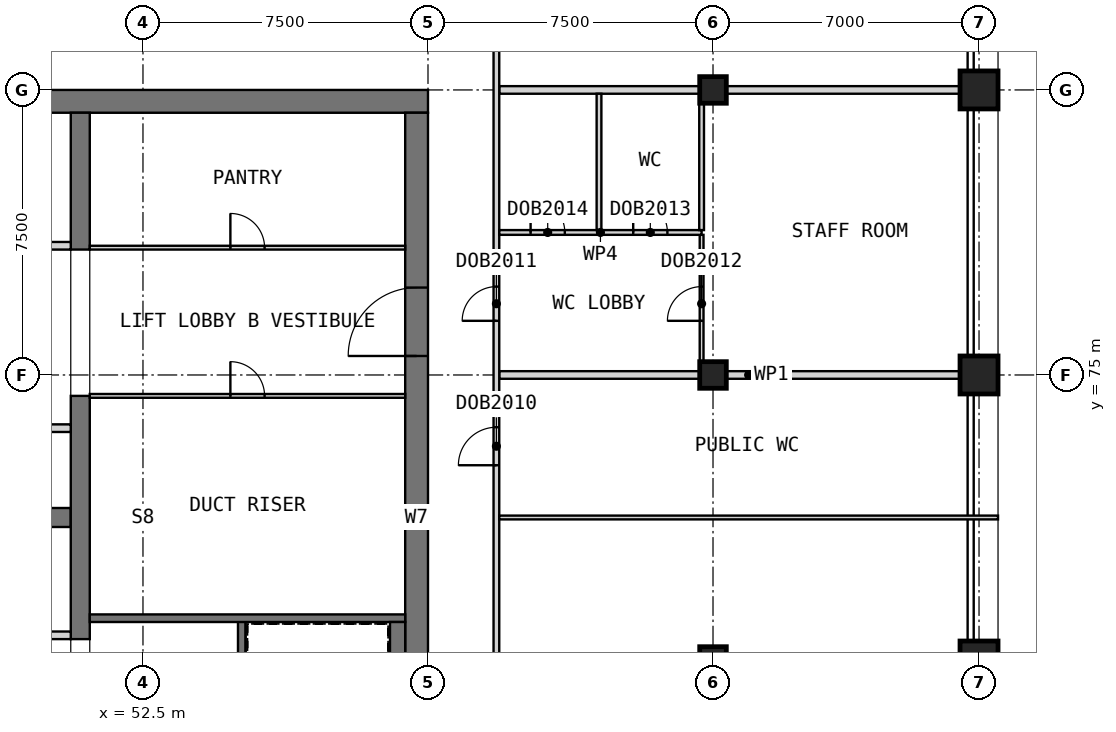
"""IFC4 building model, lengths in metres.
Left out: names, types, materials, properties, quantities, classifications, styles, units other than length and angle.
Written with IfcOpenShell. Run it as: python <this file> out.ifc"""

import sys

from ifc_helpers import new_model, si_unit, direction, frame, frame_2d, origin, origin_2d, place, context, subcontext, project, spatial, rectangle, extrude, element, fill, save


model = new_model("IFC4")
c1 = context("Model", 3, precision=1e-05, world=origin(), true_north=direction((0.0, 1.0)))
c2 = subcontext(c1, "Body", "Model", "MODEL_VIEW")
j1 = project(units=[si_unit("LENGTHUNIT", "METRE"), si_unit("PLANEANGLEUNIT", "RADIAN")], contexts=[c1])
p1 = place(None, origin())
s1 = spatial("IfcSite", under=j1, at=p1, CompositionType="ELEMENT")
p2 = place(p1, origin())
s2 = spatial("IfcBuilding", under=s1, at=p2, CompositionType="ELEMENT")
p3 = place(p2, frame((0.0, 0.0, 308.7)))
s3 = spatial("IfcBuildingStorey", under=s2, at=p3, CompositionType="ELEMENT", Elevation=308.7)
for number, where, z_axis, x_axis in (
    (1, (67.5, 67.5, 0.0), (0.0, 0.0, 1.0), (1.0, 0.0, 0.0)),
    (2, (67.5, 75.0, 0.0), (0.0, 0.0, 1.0), (1.0, 0.0, 0.0)),
    (3, (67.5, 82.5, 0.0), (0.0, 0.0, 1.0), (1.0, 0.0, 0.0)),
):
    element("IfcColumn", number, at=place(p3, frame(where, z_axis=z_axis, x_axis=x_axis)), inside=s3, PredefinedType="COLUMN", context=c2, shape_type="SweptSolid", body=[
        extrude(rectangle(XDim=0.7, YDim=0.7, at=origin_2d()), origin(), (0.0, 0.0, 1.0), 6.0),
    ])
for number, where, z_axis, x_axis in (
    (4, (74.5, 67.5, 0.0), (0.0, 0.0, 1.0), (1.0, 0.0, 0.0)),
    (5, (74.5, 75.0, 0.0), (0.0, 0.0, 1.0), (1.0, 0.0, 0.0)),
    (6, (74.5, 82.5, 0.0), (0.0, 0.0, 1.0), (1.0, 0.0, 0.0)),
):
    element("IfcColumn", number, at=place(p3, frame(where, z_axis=z_axis, x_axis=x_axis)), inside=s3, PredefinedType="COLUMN", context=c2, shape_type="SweptSolid", body=[
        extrude(rectangle(XDim=1.0, YDim=1.0, at=origin_2d()), origin(), (0.0, 0.0, 1.0), 6.0),
    ])
p4 = place(p3, frame((30.0, 82.2, 0.0), z_axis=(0.0, 0.0, 1.0), x_axis=(1.0, 0.0, 0.0)))
e7 = element("IfcWall", 7, at=p4, inside=s3, PredefinedType="SHEAR", context=c2, shape_type="SweptSolid", body=[
    extrude(rectangle(XDim=30.0, YDim=0.6, at=frame_2d((15.0, 0.0))), origin(), (0.0, 0.0, 1.0), 6.0),
])
p5 = place(p3, frame((59.7, 60.6, 0.0), z_axis=(0.0, 0.0, 1.0), x_axis=(0.0, 1.0, 0.0)))
e8 = element("IfcWall", 8, at=p5, inside=s3, PredefinedType="SHEAR", context=c2, shape_type="SweptSolid", body=[
    extrude(rectangle(XDim=21.3, YDim=0.6, at=frame_2d((10.65, 0.0))), origin(), (0.0, 0.0, 1.0), 6.0),
])
p6 = place(p5, frame((14.9, 0.0, 0.0)))
e9 = element("IfcOpeningElement", 9, at=p6, cuts=e8, PredefinedType="OPENING", context=c2, shape_type="SweptSolid", body=[
    extrude(rectangle(XDim=1.8, YDim=2.1, at=frame_2d((0.9, 1.05))), frame((0.0, 0.31, 0.0), z_axis=(0.0, -1.0, 0.0), x_axis=(1.0, 0.0, 0.0)), (0.0, 0.0, 1.0), 0.62),
])
p7 = place(p3, frame((35.0, 71.25, 0.0), z_axis=(0.0, 0.0, 1.0), x_axis=(1.0, 0.0, 0.0)))
e10 = element("IfcWall", 10, at=p7, inside=s3, PredefinedType="SHEAR", context=c2, shape_type="SweptSolid", body=[
    extrude(rectangle(XDim=15.6, YDim=0.5, at=frame_2d((7.8, 0.0))), origin(), (0.0, 0.0, 1.0), 6.0),
])
p8 = place(p3, frame((50.85, 68.05, 0.0), z_axis=(0.0, 0.0, 1.0), x_axis=(0.0, 1.0, 0.0)))
e11 = element("IfcWall", 11, at=p8, inside=s3, PredefinedType="SHEAR", context=c2, shape_type="SweptSolid", body=[
    extrude(rectangle(XDim=6.4, YDim=0.5, at=frame_2d((3.2, 0.0))), origin(), (0.0, 0.0, 1.0), 6.0),
])
p9 = place(p3, frame((50.85, 78.3, 0.0), z_axis=(0.0, 0.0, 1.0), x_axis=(0.0, 1.0, 0.0)))
e12 = element("IfcWall", 12, at=p9, inside=s3, PredefinedType="SHEAR", context=c2, shape_type="SweptSolid", body=[
    extrude(rectangle(XDim=3.6, YDim=0.5, at=frame_2d((1.8, 0.0))), origin(), (0.0, 0.0, 1.0), 6.0),
])
p10 = place(p3, frame((35.0, 68.15, 0.0), z_axis=(0.0, 0.0, 1.0), x_axis=(1.0, 0.0, 0.0)))
e13 = element("IfcWall", 13, at=p10, inside=s3, PredefinedType="PARTITIONING", context=c2, shape_type="SweptSolid", body=[
    extrude(rectangle(XDim=15.6, YDim=0.2, at=frame_2d((7.8, 0.0))), origin(), (0.0, 0.0, 1.0), 5.59),
])
p11 = place(p10, frame((2.15, 0.0, 0.0)))
e14 = element("IfcOpeningElement", 14, at=p11, cuts=e13, PredefinedType="OPENING", context=c2, shape_type="SweptSolid", body=[
    extrude(rectangle(XDim=0.9, YDim=2.1, at=frame_2d((0.45, 1.05))), frame((0.0, 0.11, 0.0), z_axis=(0.0, -1.0, 0.0), x_axis=(1.0, 0.0, 0.0)), (0.0, 0.0, 1.0), 0.22),
])
p12 = place(p10, frame((7.35, 0.0, 0.0)))
e15 = element("IfcOpeningElement", 15, at=p12, cuts=e13, PredefinedType="OPENING", context=c2, shape_type="SweptSolid", body=[
    extrude(rectangle(XDim=0.9, YDim=2.1, at=frame_2d((0.45, 1.05))), frame((0.0, 0.11, 0.0), z_axis=(0.0, -1.0, 0.0), x_axis=(1.0, 0.0, 0.0)), (0.0, 0.0, 1.0), 0.22),
])
p13 = place(p10, frame((12.55, 0.0, 0.0)))
e16 = element("IfcOpeningElement", 16, at=p13, cuts=e13, PredefinedType="OPENING", context=c2, shape_type="SweptSolid", body=[
    extrude(rectangle(XDim=0.9, YDim=2.1, at=frame_2d((0.45, 1.05))), frame((0.0, 0.11, 0.0), z_axis=(0.0, -1.0, 0.0), x_axis=(1.0, 0.0, 0.0)), (0.0, 0.0, 1.0), 0.22),
])
p14 = place(p3, frame((35.0, 73.6, 0.0), z_axis=(0.0, 0.0, 1.0), x_axis=(1.0, 0.0, 0.0)))
e17 = element("IfcWall", 17, at=p14, inside=s3, PredefinedType="SOLIDWALL", context=c2, shape_type="SweptSolid", body=[
    extrude(rectangle(XDim=15.6, YDim=0.2, at=frame_2d((7.8, 0.0))), origin(), (0.0, 0.0, 1.0), 6.0),
])
p15 = place(p14, frame((0.75, 0.0, 0.0)))
e18 = element("IfcOpeningElement", 18, at=p15, cuts=e17, PredefinedType="OPENING", context=c2, shape_type="SweptSolid", body=[
    extrude(rectangle(XDim=1.1, YDim=2.1, at=frame_2d((0.55, 1.05))), frame((0.0, 0.11, 0.0), z_axis=(0.0, -1.0, 0.0), x_axis=(1.0, 0.0, 0.0)), (0.0, 0.0, 1.0), 0.22),
])
p16 = place(p14, frame((3.35, 0.0, 0.0)))
e19 = element("IfcOpeningElement", 19, at=p16, cuts=e17, PredefinedType="OPENING", context=c2, shape_type="SweptSolid", body=[
    extrude(rectangle(XDim=1.1, YDim=2.1, at=frame_2d((0.55, 1.05))), frame((0.0, 0.11, 0.0), z_axis=(0.0, -1.0, 0.0), x_axis=(1.0, 0.0, 0.0)), (0.0, 0.0, 1.0), 0.22),
])
p17 = place(p14, frame((5.95, 0.0, 0.0)))
e20 = element("IfcOpeningElement", 20, at=p17, cuts=e17, PredefinedType="OPENING", context=c2, shape_type="SweptSolid", body=[
    extrude(rectangle(XDim=1.1, YDim=2.1, at=frame_2d((0.55, 1.05))), frame((0.0, 0.11, 0.0), z_axis=(0.0, -1.0, 0.0), x_axis=(1.0, 0.0, 0.0)), (0.0, 0.0, 1.0), 0.22),
])
p18 = place(p14, frame((8.55, 0.0, 0.0)))
e21 = element("IfcOpeningElement", 21, at=p18, cuts=e17, PredefinedType="OPENING", context=c2, shape_type="SweptSolid", body=[
    extrude(rectangle(XDim=1.1, YDim=2.1, at=frame_2d((0.55, 1.05))), frame((0.0, 0.11, 0.0), z_axis=(0.0, -1.0, 0.0), x_axis=(1.0, 0.0, 0.0)), (0.0, 0.0, 1.0), 0.22),
])
p19 = place(p14, frame((11.15, 0.0, 0.0)))
e22 = element("IfcOpeningElement", 22, at=p19, cuts=e17, PredefinedType="OPENING", context=c2, shape_type="SweptSolid", body=[
    extrude(rectangle(XDim=1.1, YDim=2.1, at=frame_2d((0.55, 1.05))), frame((0.0, 0.11, 0.0), z_axis=(0.0, -1.0, 0.0), x_axis=(1.0, 0.0, 0.0)), (0.0, 0.0, 1.0), 0.22),
])
p20 = place(p14, frame((13.75, 0.0, 0.0)))
e23 = element("IfcOpeningElement", 23, at=p20, cuts=e17, PredefinedType="OPENING", context=c2, shape_type="SweptSolid", body=[
    extrude(rectangle(XDim=1.1, YDim=2.1, at=frame_2d((0.55, 1.05))), frame((0.0, 0.11, 0.0), z_axis=(0.0, -1.0, 0.0), x_axis=(1.0, 0.0, 0.0)), (0.0, 0.0, 1.0), 0.22),
])
p21 = place(p3, frame((35.0, 78.4, 0.0), z_axis=(0.0, 0.0, 1.0), x_axis=(1.0, 0.0, 0.0)))
e24 = element("IfcWall", 24, at=p21, inside=s3, PredefinedType="SOLIDWALL", context=c2, shape_type="SweptSolid", body=[
    extrude(rectangle(XDim=15.6, YDim=0.2, at=frame_2d((7.8, 0.0))), origin(), (0.0, 0.0, 1.0), 6.0),
])
p22 = place(p21, frame((0.75, 0.0, 0.0)))
e25 = element("IfcOpeningElement", 25, at=p22, cuts=e24, PredefinedType="OPENING", context=c2, shape_type="SweptSolid", body=[
    extrude(rectangle(XDim=1.1, YDim=2.1, at=frame_2d((0.55, 1.05))), frame((0.0, 0.11, 0.0), z_axis=(0.0, -1.0, 0.0), x_axis=(1.0, 0.0, 0.0)), (0.0, 0.0, 1.0), 0.22),
])
p23 = place(p21, frame((3.35, 0.0, 0.0)))
e26 = element("IfcOpeningElement", 26, at=p23, cuts=e24, PredefinedType="OPENING", context=c2, shape_type="SweptSolid", body=[
    extrude(rectangle(XDim=1.1, YDim=2.1, at=frame_2d((0.55, 1.05))), frame((0.0, 0.11, 0.0), z_axis=(0.0, -1.0, 0.0), x_axis=(1.0, 0.0, 0.0)), (0.0, 0.0, 1.0), 0.22),
])
p24 = place(p21, frame((5.95, 0.0, 0.0)))
e27 = element("IfcOpeningElement", 27, at=p24, cuts=e24, PredefinedType="OPENING", context=c2, shape_type="SweptSolid", body=[
    extrude(rectangle(XDim=1.1, YDim=2.1, at=frame_2d((0.55, 1.05))), frame((0.0, 0.11, 0.0), z_axis=(0.0, -1.0, 0.0), x_axis=(1.0, 0.0, 0.0)), (0.0, 0.0, 1.0), 0.22),
])
p25 = place(p21, frame((8.55, 0.0, 0.0)))
e28 = element("IfcOpeningElement", 28, at=p25, cuts=e24, PredefinedType="OPENING", context=c2, shape_type="SweptSolid", body=[
    extrude(rectangle(XDim=1.1, YDim=2.1, at=frame_2d((0.55, 1.05))), frame((0.0, 0.11, 0.0), z_axis=(0.0, -1.0, 0.0), x_axis=(1.0, 0.0, 0.0)), (0.0, 0.0, 1.0), 0.22),
])
p26 = place(p21, frame((11.15, 0.0, 0.0)))
e29 = element("IfcOpeningElement", 29, at=p26, cuts=e24, PredefinedType="OPENING", context=c2, shape_type="SweptSolid", body=[
    extrude(rectangle(XDim=1.1, YDim=2.1, at=frame_2d((0.55, 1.05))), frame((0.0, 0.11, 0.0), z_axis=(0.0, -1.0, 0.0), x_axis=(1.0, 0.0, 0.0)), (0.0, 0.0, 1.0), 0.22),
])
p27 = place(p21, frame((13.75, 0.0, 0.0)))
e30 = element("IfcOpeningElement", 30, at=p27, cuts=e24, PredefinedType="OPENING", context=c2, shape_type="SweptSolid", body=[
    extrude(rectangle(XDim=1.1, YDim=2.1, at=frame_2d((0.55, 1.05))), frame((0.0, 0.11, 0.0), z_axis=(0.0, -1.0, 0.0), x_axis=(1.0, 0.0, 0.0)), (0.0, 0.0, 1.0), 0.22),
])
p28 = place(p3, frame((55.1, 60.6, 0.0), z_axis=(0.0, 0.0, 1.0), x_axis=(0.0, 1.0, 0.0)))
e31 = element("IfcWall", 31, at=p28, inside=s3, PredefinedType="SOLIDWALL", context=c2, shape_type="SweptSolid", body=[
    extrude(rectangle(XDim=8.0, YDim=0.2, at=frame_2d((4.0, 0.0))), origin(), (0.0, 0.0, 1.0), 5.59),
])
p29 = place(p3, frame((51.1, 68.6, 0.0), z_axis=(0.0, 0.0, 1.0), x_axis=(1.0, 0.0, 0.0)))
e32 = element("IfcWall", 32, at=p29, inside=s3, PredefinedType="SOLIDWALL", context=c2, shape_type="SweptSolid", body=[
    extrude(rectangle(XDim=8.3, YDim=0.2, at=frame_2d((4.15, 0.0))), origin(), (0.0, 0.0, 1.0), 5.59),
])
p30 = place(p3, frame((59.2, 60.6, 0.0), z_axis=(0.0, 0.0, 1.0), x_axis=(0.0, 1.0, 0.0)))
e33 = element("IfcWall", 33, at=p30, inside=s3, PredefinedType="SOLIDWALL", context=c2, shape_type="SweptSolid", body=[
    extrude(rectangle(XDim=7.9, YDim=0.4, at=frame_2d((3.95, 0.0))), origin(), (0.0, 0.0, 1.0), 5.59),
])
p31 = place(p3, frame((51.1, 74.45, 0.0), z_axis=(0.0, 0.0, 1.0), x_axis=(1.0, 0.0, 0.0)))
e34 = element("IfcWall", 34, at=p31, inside=s3, PredefinedType="PARTITIONING", context=c2, shape_type="SweptSolid", body=[
    extrude(rectangle(XDim=8.3, YDim=0.1, at=frame_2d((4.15, 0.0))), origin(), (0.0, 0.0, 1.0), 5.59),
])
p32 = place(p31, frame((3.7, 0.0, 0.0)))
e35 = element("IfcOpeningElement", 35, at=p32, cuts=e34, PredefinedType="OPENING", context=c2, shape_type="SweptSolid", body=[
    extrude(rectangle(XDim=0.9, YDim=2.1, at=frame_2d((0.45, 1.05))), frame((0.0, 0.06, 0.0), z_axis=(0.0, -1.0, 0.0), x_axis=(1.0, 0.0, 0.0)), (0.0, 0.0, 1.0), 0.12),
])
p33 = place(p3, frame((51.1, 78.35, 0.0), z_axis=(0.0, 0.0, 1.0), x_axis=(1.0, 0.0, 0.0)))
e36 = element("IfcWall", 36, at=p33, inside=s3, PredefinedType="PARTITIONING", context=c2, shape_type="SweptSolid", body=[
    extrude(rectangle(XDim=8.3, YDim=0.1, at=frame_2d((4.15, 0.0))), origin(), (0.0, 0.0, 1.0), 5.59),
])
p34 = place(p33, frame((3.7, 0.0, 0.0)))
e37 = element("IfcOpeningElement", 37, at=p34, cuts=e36, PredefinedType="OPENING", context=c2, shape_type="SweptSolid", body=[
    extrude(rectangle(XDim=0.9, YDim=2.1, at=frame_2d((0.45, 1.05))), frame((0.0, 0.06, 0.0), z_axis=(0.0, -1.0, 0.0), x_axis=(1.0, 0.0, 0.0)), (0.0, 0.0, 1.0), 0.12),
])
for number, where, z_axis, x_axis in (
    (38, (61.875, 75.0, 0.0), (0.0, 0.0, 1.0), (1.0, 0.0, 0.0)),
    (39, (61.875, 82.5, 0.0), (0.0, 0.0, 1.0), (1.0, 0.0, 0.0)),
):
    element("IfcWall", number, at=place(p3, frame(where, z_axis=z_axis, x_axis=x_axis)), inside=s3, PredefinedType="PARTITIONING", context=c2, shape_type="SweptSolid", body=[
        extrude(rectangle(XDim=13.125, YDim=0.2, at=frame_2d((6.562, 0.0))), origin(), (0.0, 0.0, 1.0), 5.6),
    ])
p35 = place(p3, frame((61.8, 58.275, 0.0), z_axis=(0.0, 0.0, 1.0), x_axis=(0.0, 1.0, 0.0)))
e40 = element("IfcWall", 40, at=p35, inside=s3, PredefinedType="PARTITIONING", context=c2, shape_type="SweptSolid", body=[
    extrude(rectangle(XDim=25.95, YDim=0.15, at=frame_2d((12.975, 0.0))), origin(), (0.0, 0.0, 1.0), 5.6),
])
p36 = place(p35, frame((6.85, 0.0, 0.0)))
e41 = element("IfcOpeningElement", 41, at=p36, cuts=e40, PredefinedType="OPENING", context=c2, shape_type="SweptSolid", body=[
    extrude(rectangle(XDim=1.0, YDim=2.1, at=frame_2d((0.5, 1.05))), frame((0.0, 0.085, 0.0), z_axis=(0.0, -1.0, 0.0), x_axis=(1.0, 0.0, 0.0)), (0.0, 0.0, 1.0), 0.17),
])
p37 = place(p35, frame((14.35, 0.0, 0.0)))
e42 = element("IfcOpeningElement", 42, at=p37, cuts=e40, PredefinedType="OPENING", context=c2, shape_type="SweptSolid", body=[
    extrude(rectangle(XDim=1.0, YDim=2.1, at=frame_2d((0.5, 1.05))), frame((0.0, 0.085, 0.0), z_axis=(0.0, -1.0, 0.0), x_axis=(1.0, 0.0, 0.0)), (0.0, 0.0, 1.0), 0.17),
])
p38 = place(p35, frame((18.15, 0.0, 0.0)))
e43 = element("IfcOpeningElement", 43, at=p38, cuts=e40, PredefinedType="OPENING", context=c2, shape_type="SweptSolid", body=[
    extrude(rectangle(XDim=0.9, YDim=2.1, at=frame_2d((0.45, 1.05))), frame((0.0, 0.085, 0.0), z_axis=(0.0, -1.0, 0.0), x_axis=(1.0, 0.0, 0.0)), (0.0, 0.0, 1.0), 0.17),
])
p39 = place(p3, frame((61.875, 71.25, 0.0), z_axis=(0.0, 0.0, 1.0), x_axis=(1.0, 0.0, 0.0)))
e44 = element("IfcWall", 44, at=p39, inside=s3, PredefinedType="PARTITIONING", context=c2, shape_type="SweptSolid", body=[
    extrude(rectangle(XDim=13.125, YDim=0.1, at=frame_2d((6.562, 0.0))), origin(), (0.0, 0.0, 1.0), 5.6),
])
p40 = place(p3, frame((67.2, 75.1, 0.0), z_axis=(0.0, 0.0, 1.0), x_axis=(0.0, 1.0, 0.0)))
e45 = element("IfcWall", 45, at=p40, inside=s3, PredefinedType="PARTITIONING", context=c2, shape_type="SweptSolid", body=[
    extrude(rectangle(XDim=3.587, YDim=0.1, at=frame_2d((1.794, 0.0))), origin(), (0.0, 0.0, 1.0), 5.6),
])
p41 = place(p40, frame((1.325, 0.0, 0.0)))
e46 = element("IfcOpeningElement", 46, at=p41, cuts=e45, PredefinedType="OPENING", context=c2, shape_type="SweptSolid", body=[
    extrude(rectangle(XDim=0.9, YDim=2.1, at=frame_2d((0.45, 1.05))), frame((0.0, 0.06, 0.0), z_axis=(0.0, -1.0, 0.0), x_axis=(1.0, 0.0, 0.0)), (0.0, 0.0, 1.0), 0.12),
])
p42 = place(p3, frame((61.875, 78.75, 0.0), z_axis=(0.0, 0.0, 1.0), x_axis=(1.0, 0.0, 0.0)))
e47 = element("IfcWall", 47, at=p42, inside=s3, PredefinedType="PARTITIONING", context=c2, shape_type="SweptSolid", body=[
    extrude(rectangle(XDim=5.325, YDim=0.125, at=frame_2d((2.663, 0.0))), origin(), (0.0, 0.0, 1.0), 5.6),
])
p43 = place(p42, frame((3.525, 0.0, 0.0)))
e48 = element("IfcOpeningElement", 48, at=p43, cuts=e47, PredefinedType="OPENING", context=c2, shape_type="SweptSolid", body=[
    extrude(rectangle(XDim=0.9, YDim=2.1, at=frame_2d((0.45, 1.05))), frame((0.0, 0.073, 0.0), z_axis=(0.0, -1.0, 0.0), x_axis=(1.0, 0.0, 0.0)), (0.0, 0.0, 1.0), 0.145),
])
p44 = place(p42, frame((0.825, 0.0, 0.0)))
e49 = element("IfcOpeningElement", 49, at=p44, cuts=e47, PredefinedType="OPENING", context=c2, shape_type="SweptSolid", body=[
    extrude(rectangle(XDim=0.9, YDim=2.1, at=frame_2d((0.45, 1.05))), frame((0.0, 0.073, 0.0), z_axis=(0.0, -1.0, 0.0), x_axis=(1.0, 0.0, 0.0)), (0.0, 0.0, 1.0), 0.145),
])
for number, where, z_axis, x_axis in (
    (50, (64.5, 78.812, 0.0), (0.0, 0.0, 1.0), (0.0, 1.0, 0.0)),
    (51, (67.2, 78.812, 0.0), (0.0, 0.0, 1.0), (0.0, 1.0, 0.0)),
):
    element("IfcWall", number, at=place(p3, frame(where, z_axis=z_axis, x_axis=x_axis)), inside=s3, PredefinedType="PARTITIONING", context=c2, shape_type="SweptSolid", body=[
        extrude(rectangle(XDim=3.587, YDim=0.125, at=frame_2d((1.794, 0.0))), origin(), (0.0, 0.0, 1.0), 5.6),
    ])
p45 = place(p6, origin())
e52 = element("IfcDoor", 52, at=p45, inside=s3, OperationType="DOUBLE_DOOR_SINGLE_SWING", PredefinedType="DOOR", context=c2, shape_type="SweptSolid", body=[
    extrude(rectangle(XDim=1.8, YDim=2.1, at=frame_2d((0.9, 1.05))), frame((0.0, 0.025, 0.0), z_axis=(0.0, -1.0, 0.0), x_axis=(1.0, 0.0, 0.0)), (0.0, 0.0, 1.0), 0.05),
])
fill(e9, e52)
p46 = place(p32, origin())
e53 = element("IfcDoor", 53, at=p46, inside=s3, OperationType="SINGLE_SWING_RIGHT", PredefinedType="DOOR", context=c2, shape_type="SweptSolid", body=[
    extrude(rectangle(XDim=0.9, YDim=2.1, at=frame_2d((0.45, 1.05))), frame((0.0, 0.025, 0.0), z_axis=(0.0, -1.0, 0.0), x_axis=(1.0, 0.0, 0.0)), (0.0, 0.0, 1.0), 0.05),
])
fill(e35, e53)
p47 = place(p34, origin())
e54 = element("IfcDoor", 54, at=p47, inside=s3, OperationType="SINGLE_SWING_RIGHT", PredefinedType="DOOR", context=c2, shape_type="SweptSolid", body=[
    extrude(rectangle(XDim=0.9, YDim=2.1, at=frame_2d((0.45, 1.05))), frame((0.0, 0.025, 0.0), z_axis=(0.0, -1.0, 0.0), x_axis=(1.0, 0.0, 0.0)), (0.0, 0.0, 1.0), 0.05),
])
fill(e37, e54)
p48 = place(p37, origin())
e55 = element("IfcDoor", 55, at=p48, inside=s3, OperationType="SINGLE_SWING_RIGHT", PredefinedType="DOOR", context=c2, shape_type="SweptSolid", body=[
    extrude(rectangle(XDim=1.0, YDim=2.1, at=frame_2d((0.5, 1.05))), frame((0.0, 0.025, 0.0), z_axis=(0.0, -1.0, 0.0), x_axis=(1.0, 0.0, 0.0)), (0.0, 0.0, 1.0), 0.05),
])
fill(e42, e55)
p49 = place(p38, origin())
e56 = element("IfcDoor", 56, at=p49, inside=s3, OperationType="SINGLE_SWING_RIGHT", PredefinedType="DOOR", context=c2, shape_type="SweptSolid", body=[
    extrude(rectangle(XDim=0.9, YDim=2.1, at=frame_2d((0.45, 1.05))), frame((0.0, 0.025, 0.0), z_axis=(0.0, -1.0, 0.0), x_axis=(1.0, 0.0, 0.0)), (0.0, 0.0, 1.0), 0.05),
])
fill(e43, e56)
p50 = place(p41, origin())
e57 = element("IfcDoor", 57, at=p50, inside=s3, OperationType="SINGLE_SWING_LEFT", PredefinedType="DOOR", context=c2, shape_type="SweptSolid", body=[
    extrude(rectangle(XDim=0.9, YDim=2.1, at=frame_2d((0.45, 1.05))), frame((0.0, 0.025, 0.0), z_axis=(0.0, -1.0, 0.0), x_axis=(1.0, 0.0, 0.0)), (0.0, 0.0, 1.0), 0.05),
])
fill(e46, e57)
p51 = place(p43, origin())
e58 = element("IfcDoor", 58, at=p51, inside=s3, OperationType="SINGLE_SWING_LEFT", PredefinedType="DOOR", context=c2, shape_type="SweptSolid", body=[
    extrude(rectangle(XDim=0.9, YDim=2.1, at=frame_2d((0.45, 1.05))), frame((0.0, 0.025, 0.0), z_axis=(0.0, -1.0, 0.0), x_axis=(1.0, 0.0, 0.0)), (0.0, 0.0, 1.0), 0.05),
])
fill(e48, e58)
p52 = place(p44, origin())
e59 = element("IfcDoor", 59, at=p52, inside=s3, OperationType="SINGLE_SWING_LEFT", PredefinedType="DOOR", context=c2, shape_type="SweptSolid", body=[
    extrude(rectangle(XDim=0.9, YDim=2.1, at=frame_2d((0.45, 1.05))), frame((0.0, 0.025, 0.0), z_axis=(0.0, -1.0, 0.0), x_axis=(1.0, 0.0, 0.0)), (0.0, 0.0, 1.0), 0.05),
])
fill(e49, e59)
save(model, sys.argv[1])
